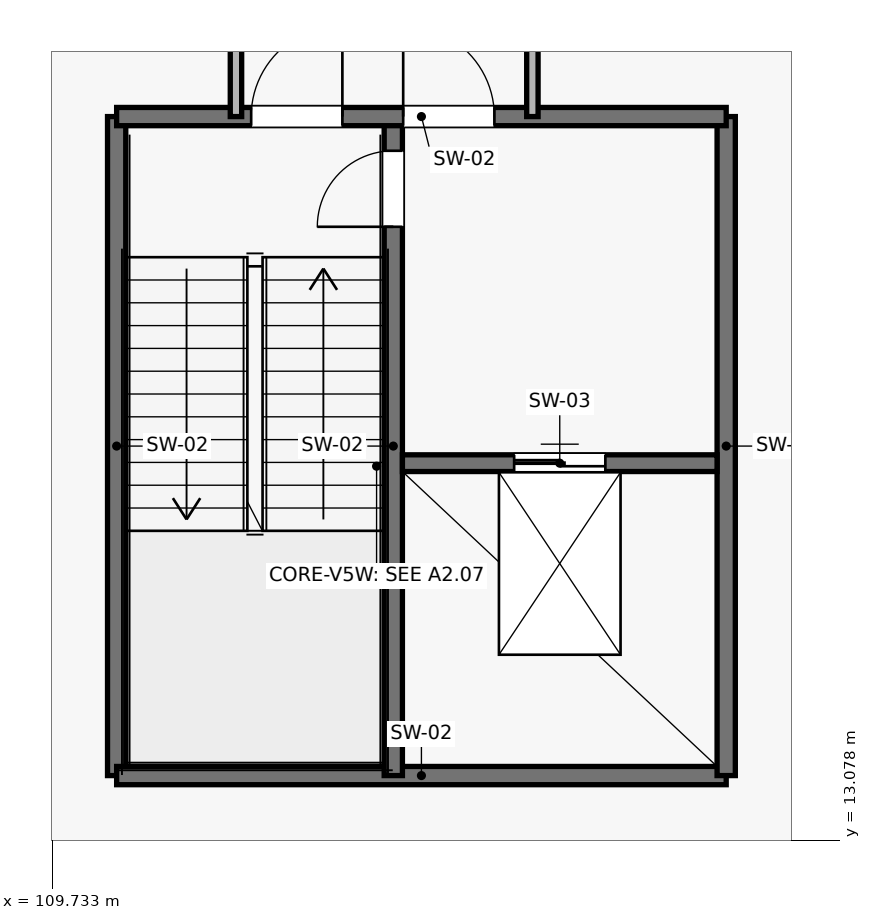
"""IFC4 building model, lengths in metres.
Left out: names, types, materials, properties, quantities, classifications, styles, units other than length and angle.
Written with IfcOpenShell. Run it as: python <this file> out.ifc"""

import sys

from ifc_helpers import new_model, si_unit, direction, frame, frame_2d, origin, place, context, subcontext, project, spatial, rectangle, extrude, element, fill, save


model = new_model("IFC4")
c1 = context("Model", 3, precision=1e-05, world=origin(), true_north=direction((0.0, 1.0)))
c2 = subcontext(c1, "Body", "Model", "MODEL_VIEW")
j1 = project(units=[si_unit("LENGTHUNIT", "METRE"), si_unit("PLANEANGLEUNIT", "RADIAN")], contexts=[c1])
p1 = place(None, origin())
s1 = spatial("IfcSite", under=j1, at=p1, CompositionType="ELEMENT")
p2 = place(p1, origin())
s2 = spatial("IfcBuilding", under=s1, at=p2, CompositionType="ELEMENT")
p3 = place(p2, frame((0.0, 0.0, 11.4)))
s3 = spatial("IfcBuildingStorey", under=s2, at=p3, CompositionType="ELEMENT", Elevation=11.4)
p4 = place(p3, frame((110.58, 22.6, 0.0), z_axis=(0.0, 0.0, 1.0), x_axis=(0.0, -1.0, 0.0)))
e1 = element("IfcWall", 1, at=p4, inside=s3, PredefinedType="SHEAR", context=c2, shape_type="SweptSolid", body=[
    extrude(rectangle(XDim=8.67, YDim=0.24, at=frame_2d((4.335, 0.0))), origin(), (0.0, 0.0, 1.0), 4.48),
])
p5 = place(p3, frame((110.58, 13.93, 0.0), z_axis=(0.0, 0.0, 1.0), x_axis=(1.0, 0.0, 0.0)))
e2 = element("IfcWall", 2, at=p5, inside=s3, PredefinedType="SHEAR", context=c2, shape_type="SweptSolid", body=[
    extrude(rectangle(XDim=8.02, YDim=0.24, at=frame_2d((4.01, 0.0))), origin(), (0.0, 0.0, 1.0), 4.48),
])
p6 = place(p3, frame((114.22, 13.93, 0.0), z_axis=(0.0, 0.0, 1.0), x_axis=(0.0, 1.0, 0.0)))
e3 = element("IfcWall", 3, at=p6, inside=s3, PredefinedType="SHEAR", context=c2, shape_type="SweptSolid", body=[
    extrude(rectangle(XDim=8.67, YDim=0.24, at=frame_2d((4.335, 0.0))), origin(), (0.0, 0.0, 1.0), 4.48),
])
p7 = place(p6, frame((7.22, 0.0, 0.0)))
e4 = element("IfcOpeningElement", 4, at=p7, cuts=e3, PredefinedType="OPENING", context=c2, shape_type="SweptSolid", body=[
    extrude(rectangle(XDim=1.0, YDim=2.2, at=frame_2d((0.5, 1.1))), frame((0.0, 0.135, 0.0), z_axis=(0.0, -1.0, 0.0), x_axis=(1.0, 0.0, 0.0)), (0.0, 0.0, 1.0), 0.27),
])
p8 = place(p3, frame((118.6, 13.93, 0.0), z_axis=(0.0, 0.0, 1.0), x_axis=(0.0, 1.0, 0.0)))
e5 = element("IfcWall", 5, at=p8, inside=s3, PredefinedType="SHEAR", context=c2, shape_type="SweptSolid", body=[
    extrude(rectangle(XDim=8.67, YDim=0.24, at=frame_2d((4.335, 0.0))), origin(), (0.0, 0.0, 1.0), 4.48),
])
p9 = place(p3, frame((110.58, 22.6, 0.0), z_axis=(0.0, 0.0, 1.0), x_axis=(1.0, 0.0, 0.0)))
e6 = element("IfcWall", 6, at=p9, inside=s3, PredefinedType="SHEAR", context=c2, shape_type="SweptSolid", body=[
    extrude(rectangle(XDim=8.02, YDim=0.24, at=frame_2d((4.01, 0.0))), origin(), (0.0, 0.0, 1.0), 4.48),
])
p10 = place(p9, frame((1.77, 0.0, 0.0)))
e7 = element("IfcOpeningElement", 7, at=p10, cuts=e6, PredefinedType="OPENING", context=c2, shape_type="SweptSolid", body=[
    extrude(rectangle(XDim=1.2, YDim=2.2, at=frame_2d((0.6, 1.1))), frame((0.0, 0.135, 0.0), z_axis=(0.0, -1.0, 0.0), x_axis=(1.0, 0.0, 0.0)), (0.0, 0.0, 1.0), 0.27),
])
p11 = place(p9, frame((3.77, 0.0, 0.0)))
e8 = element("IfcOpeningElement", 8, at=p11, cuts=e6, PredefinedType="OPENING", context=c2, shape_type="SweptSolid", body=[
    extrude(rectangle(XDim=1.2, YDim=2.2, at=frame_2d((0.6, 1.1))), frame((0.0, 0.135, 0.0), z_axis=(0.0, -1.0, 0.0), x_axis=(1.0, 0.0, 0.0)), (0.0, 0.0, 1.0), 0.27),
])
p12 = place(p3, frame((114.34, 18.04, 0.0), z_axis=(0.0, 0.0, 1.0), x_axis=(1.0, 0.0, 0.0)))
e9 = element("IfcWall", 9, at=p12, inside=s3, PredefinedType="SHEAR", context=c2, shape_type="SweptSolid", body=[
    extrude(rectangle(XDim=4.14, YDim=0.22, at=frame_2d((2.07, 0.0))), origin(), (0.0, 0.0, 1.0), 4.48),
])
p13 = place(p12, frame((1.47, 0.0, 0.0)))
e10 = element("IfcOpeningElement", 10, at=p13, cuts=e9, PredefinedType="OPENING", context=c2, shape_type="SweptSolid", body=[
    extrude(rectangle(XDim=1.2, YDim=2.2, at=frame_2d((0.6, 1.1))), frame((0.0, 0.125, 0.0), z_axis=(0.0, -1.0, 0.0), x_axis=(1.0, 0.0, 0.0)), (0.0, 0.0, 1.0), 0.25),
])
for number, where, z_axis, x_axis in (
    (11, (112.15, 22.6, 0.0), (0.0, 0.0, 1.0), (0.0, 1.0, 0.0)),
    (12, (116.05, 22.6, 0.0), (0.0, 0.0, 1.0), (0.0, 1.0, 0.0)),
):
    element("IfcWall", number, at=place(p3, frame(where, z_axis=z_axis, x_axis=x_axis)), inside=s3, PredefinedType="PARTITIONING", context=c2, shape_type="SweptSolid", body=[
        extrude(rectangle(XDim=2.8, YDim=0.15, at=frame_2d((1.4, 0.0))), origin(), (0.0, 0.0, 1.0), 3.463),
    ])
p14 = place(p10, origin())
e13 = element("IfcDoor", 13, at=p14, inside=s3, OperationType="SINGLE_SWING_RIGHT", PredefinedType="DOOR", context=c2, shape_type="SweptSolid", body=[
    extrude(rectangle(XDim=1.2, YDim=2.2, at=frame_2d((0.6, 1.1))), frame((0.0, 0.025, 0.0), z_axis=(0.0, -1.0, 0.0), x_axis=(1.0, 0.0, 0.0)), (0.0, 0.0, 1.0), 0.05),
])
fill(e7, e13)
p15 = place(p11, origin())
e14 = element("IfcDoor", 14, at=p15, inside=s3, OperationType="SINGLE_SWING_LEFT", PredefinedType="DOOR", context=c2, shape_type="SweptSolid", body=[
    extrude(rectangle(XDim=1.2, YDim=2.2, at=frame_2d((0.6, 1.1))), frame((0.0, 0.025, 0.0), z_axis=(0.0, -1.0, 0.0), x_axis=(1.0, 0.0, 0.0)), (0.0, 0.0, 1.0), 0.05),
])
fill(e8, e14)
p16 = place(p7, origin())
e15 = element("IfcDoor", 15, at=p16, inside=s3, OperationType="SINGLE_SWING_LEFT", PredefinedType="DOOR", context=c2, shape_type="SweptSolid", body=[
    extrude(rectangle(XDim=1.0, YDim=2.2, at=frame_2d((0.5, 1.1))), frame((0.0, 0.025, 0.0), z_axis=(0.0, -1.0, 0.0), x_axis=(1.0, 0.0, 0.0)), (0.0, 0.0, 1.0), 0.05),
])
fill(e4, e15)
p17 = place(p13, origin())
e16 = element("IfcDoor", 16, at=p17, inside=s3, OperationType="DOUBLE_DOOR_SLIDING", PredefinedType="DOOR", context=c2, shape_type="SweptSolid", body=[
    extrude(rectangle(XDim=1.2, YDim=2.2, at=frame_2d((0.6, 1.1))), frame((0.0, 0.025, 0.0), z_axis=(0.0, -1.0, 0.0), x_axis=(1.0, 0.0, 0.0)), (0.0, 0.0, 1.0), 0.05),
])
fill(e10, e16)
save(model, sys.argv[1])
